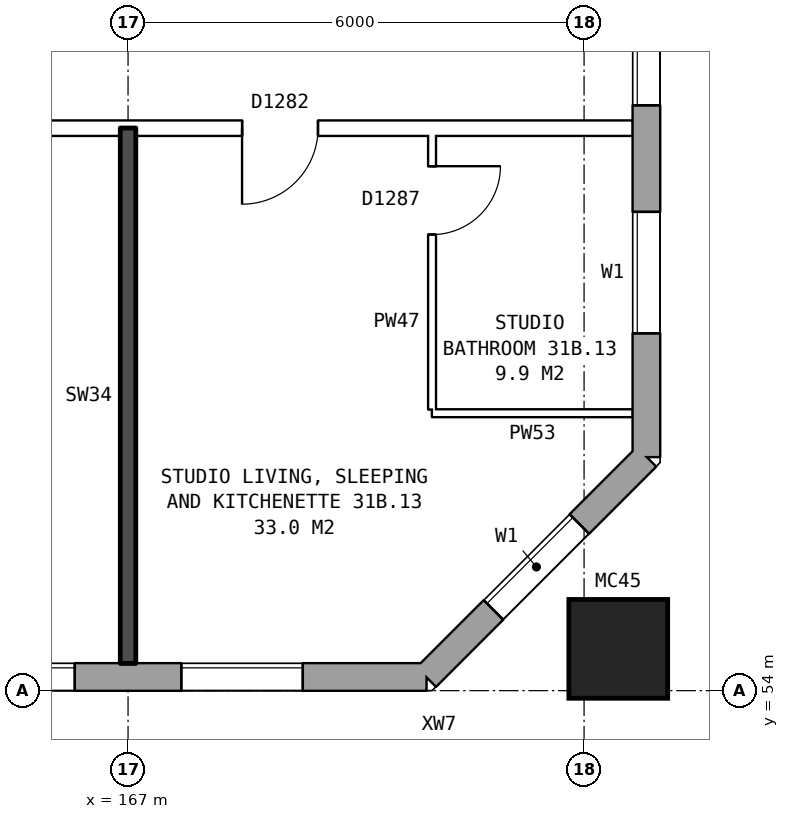
"""IFC4 building model, lengths in metres.
Left out: names, types, materials, properties, quantities, classifications, styles, units other than length and angle.
Written with IfcOpenShell. Run it as: python <this file> out.ifc"""

import sys

from ifc_helpers import new_model, si_unit, direction, frame, frame_2d, origin, origin_2d, place, context, subcontext, project, spatial, rectangle, hollow_rectangle, extrude, element, fill, save


model = new_model("IFC4")
c1 = context("Model", 3, precision=1e-05, world=origin(), true_north=direction((0.0, 1.0)))
c2 = subcontext(c1, "Body", "Model", "MODEL_VIEW")
j1 = project(units=[si_unit("LENGTHUNIT", "METRE"), si_unit("PLANEANGLEUNIT", "RADIAN")], contexts=[c1])
p1 = place(None, origin())
s1 = spatial("IfcSite", under=j1, at=p1, CompositionType="ELEMENT")
p2 = place(p1, origin())
s2 = spatial("IfcBuilding", under=s1, at=p2, CompositionType="ELEMENT")
p3 = place(p2, frame((0.0, 0.0, 111.9)))
s3 = spatial("IfcBuildingStorey", under=s2, at=p3, CompositionType="ELEMENT", Elevation=111.9)
p4 = place(p3, frame((173.45, 54.55, 0.0), z_axis=(0.0, 0.0, 1.0), x_axis=(1.0, 0.0, 0.0)))
e1 = element("IfcColumn", 1, at=p4, inside=s3, PredefinedType="COLUMN", context=c2, shape_type="SweptSolid", body=[
    extrude(hollow_rectangle(XDim=1.3, YDim=1.3, WallThickness=0.07, at=origin_2d()), origin(), (0.0, 0.0, 1.0), 3.1),
])
p5 = place(p3, frame((134.075, 54.18, 0.0), z_axis=(0.0, 0.0, 1.0), x_axis=(1.0, 0.0, 0.0)))
e2 = element("IfcWall", 2, at=p5, inside=s3, PredefinedType="STANDARD", context=c2, shape_type="SweptSolid", body=[
    extrude(rectangle(XDim=36.851, YDim=0.36, at=frame_2d((18.425, 0.0))), origin(), (0.0, 0.0, 1.0), 2.85),
])
p6 = place(p5, frame((0.625, 0.0, 0.8)))
e3 = element("IfcOpeningElement", 3, at=p6, cuts=e2, PredefinedType="OPENING", context=c2, shape_type="SweptSolid", body=[
    extrude(rectangle(XDim=1.6, YDim=1.8, at=frame_2d((0.8, 0.9))), frame((0.0, 0.19, 0.0), z_axis=(0.0, -1.0, 0.0), x_axis=(1.0, 0.0, 0.0)), (0.0, 0.0, 1.0), 0.38),
])
p7 = place(p5, frame((3.625, 0.0, 0.8)))
e4 = element("IfcOpeningElement", 4, at=p7, cuts=e2, PredefinedType="OPENING", context=c2, shape_type="SweptSolid", body=[
    extrude(rectangle(XDim=1.6, YDim=1.8, at=frame_2d((0.8, 0.9))), frame((0.0, 0.19, 0.0), z_axis=(0.0, -1.0, 0.0), x_axis=(1.0, 0.0, 0.0)), (0.0, 0.0, 1.0), 0.38),
])
p8 = place(p5, frame((6.625, 0.0, 0.8)))
e5 = element("IfcOpeningElement", 5, at=p8, cuts=e2, PredefinedType="OPENING", context=c2, shape_type="SweptSolid", body=[
    extrude(rectangle(XDim=1.6, YDim=1.8, at=frame_2d((0.8, 0.9))), frame((0.0, 0.19, 0.0), z_axis=(0.0, -1.0, 0.0), x_axis=(1.0, 0.0, 0.0)), (0.0, 0.0, 1.0), 0.38),
])
p9 = place(p5, frame((9.625, 0.0, 0.8)))
e6 = element("IfcOpeningElement", 6, at=p9, cuts=e2, PredefinedType="OPENING", context=c2, shape_type="SweptSolid", body=[
    extrude(rectangle(XDim=1.6, YDim=1.8, at=frame_2d((0.8, 0.9))), frame((0.0, 0.19, 0.0), z_axis=(0.0, -1.0, 0.0), x_axis=(1.0, 0.0, 0.0)), (0.0, 0.0, 1.0), 0.38),
])
p10 = place(p5, frame((12.625, 0.0, 0.8)))
e7 = element("IfcOpeningElement", 7, at=p10, cuts=e2, PredefinedType="OPENING", context=c2, shape_type="SweptSolid", body=[
    extrude(rectangle(XDim=1.6, YDim=1.8, at=frame_2d((0.8, 0.9))), frame((0.0, 0.19, 0.0), z_axis=(0.0, -1.0, 0.0), x_axis=(1.0, 0.0, 0.0)), (0.0, 0.0, 1.0), 0.38),
])
p11 = place(p5, frame((15.125, 0.0, 1.35)))
e8 = element("IfcOpeningElement", 8, at=p11, cuts=e2, PredefinedType="OPENING", context=c2, shape_type="SweptSolid", body=[
    extrude(rectangle(XDim=1.2, YDim=1.2, at=frame_2d((0.6, 0.6))), frame((0.0, 0.19, 0.0), z_axis=(0.0, -1.0, 0.0), x_axis=(1.0, 0.0, 0.0)), (0.0, 0.0, 1.0), 0.38),
])
p12 = place(p5, frame((18.075, 0.0, 0.25)))
e9 = element("IfcOpeningElement", 9, at=p12, cuts=e2, PredefinedType="OPENING", context=c2, shape_type="SweptSolid", body=[
    extrude(rectangle(XDim=0.8, YDim=1.5, at=frame_2d((0.4, 0.75))), frame((0.0, 0.19, 0.0), z_axis=(0.0, -1.0, 0.0), x_axis=(1.0, 0.0, 0.0)), (0.0, 0.0, 1.0), 0.38),
])
p13 = place(p5, frame((21.625, 0.0, 0.8)))
e10 = element("IfcOpeningElement", 10, at=p13, cuts=e2, PredefinedType="OPENING", context=c2, shape_type="SweptSolid", body=[
    extrude(rectangle(XDim=1.6, YDim=1.8, at=frame_2d((0.8, 0.9))), frame((0.0, 0.19, 0.0), z_axis=(0.0, -1.0, 0.0), x_axis=(1.0, 0.0, 0.0)), (0.0, 0.0, 1.0), 0.38),
])
p14 = place(p5, frame((24.625, 0.0, 0.8)))
e11 = element("IfcOpeningElement", 11, at=p14, cuts=e2, PredefinedType="OPENING", context=c2, shape_type="SweptSolid", body=[
    extrude(rectangle(XDim=1.6, YDim=1.8, at=frame_2d((0.8, 0.9))), frame((0.0, 0.19, 0.0), z_axis=(0.0, -1.0, 0.0), x_axis=(1.0, 0.0, 0.0)), (0.0, 0.0, 1.0), 0.38),
])
p15 = place(p5, frame((27.625, 0.0, 0.8)))
e12 = element("IfcOpeningElement", 12, at=p15, cuts=e2, PredefinedType="OPENING", context=c2, shape_type="SweptSolid", body=[
    extrude(rectangle(XDim=1.6, YDim=1.8, at=frame_2d((0.8, 0.9))), frame((0.0, 0.19, 0.0), z_axis=(0.0, -1.0, 0.0), x_axis=(1.0, 0.0, 0.0)), (0.0, 0.0, 1.0), 0.38),
])
p16 = place(p5, frame((30.625, 0.0, 0.8)))
e13 = element("IfcOpeningElement", 13, at=p16, cuts=e2, PredefinedType="OPENING", context=c2, shape_type="SweptSolid", body=[
    extrude(rectangle(XDim=1.6, YDim=1.8, at=frame_2d((0.8, 0.9))), frame((0.0, 0.19, 0.0), z_axis=(0.0, -1.0, 0.0), x_axis=(1.0, 0.0, 0.0)), (0.0, 0.0, 1.0), 0.38),
])
p17 = place(p5, frame((33.625, 0.0, 0.8)))
e14 = element("IfcOpeningElement", 14, at=p17, cuts=e2, PredefinedType="OPENING", context=c2, shape_type="SweptSolid", body=[
    extrude(rectangle(XDim=1.6, YDim=1.8, at=frame_2d((0.8, 0.9))), frame((0.0, 0.19, 0.0), z_axis=(0.0, -1.0, 0.0), x_axis=(1.0, 0.0, 0.0)), (0.0, 0.0, 1.0), 0.38),
])
p18 = place(p5, frame((17.075, 0.0, 0.15)))
e15 = element("IfcOpeningElement", 15, at=p18, cuts=e2, PredefinedType="OPENING", context=c2, shape_type="SweptSolid", body=[
    extrude(rectangle(XDim=0.6, YDim=0.9, at=frame_2d((0.3, 0.45))), frame((0.0, 0.19, 0.0), z_axis=(0.0, -1.0, 0.0), x_axis=(1.0, 0.0, 0.0)), (0.0, 0.0, 1.0), 0.38),
])
p19 = place(p5, frame((19.175, 0.0, 0.15)))
e16 = element("IfcOpeningElement", 16, at=p19, cuts=e2, PredefinedType="OPENING", context=c2, shape_type="SweptSolid", body=[
    extrude(rectangle(XDim=0.6, YDim=0.9, at=frame_2d((0.3, 0.45))), frame((0.0, 0.19, 0.0), z_axis=(0.0, -1.0, 0.0), x_axis=(1.0, 0.0, 0.0)), (0.0, 0.0, 1.0), 0.38),
])
p20 = place(p3, frame((170.925, 54.18, 0.0), z_axis=(0.0, 0.0, 1.0), x_axis=(0.707106781187, 0.707106781187, 0.0)))
e17 = element("IfcWall", 17, at=p20, inside=s3, PredefinedType="STANDARD", context=c2, shape_type="SweptSolid", body=[
    extrude(rectangle(XDim=4.094, YDim=0.36, at=frame_2d((2.047, 0.0))), origin(), (0.0, 0.0, 1.0), 2.85),
])
p21 = place(p20, frame((1.247, 0.0, 0.8)))
e18 = element("IfcOpeningElement", 18, at=p21, cuts=e17, PredefinedType="OPENING", context=c2, shape_type="SweptSolid", body=[
    extrude(rectangle(XDim=1.6, YDim=1.8, at=frame_2d((0.8, 0.9))), frame((0.0, 0.19, 0.0), z_axis=(0.0, -1.0, 0.0), x_axis=(1.0, 0.0, 0.0)), (0.0, 0.0, 1.0), 0.38),
])
p22 = place(p3, frame((173.82, 57.075, 0.0), z_axis=(0.0, 0.0, 1.0), x_axis=(0.0, 1.0, 0.0)))
e19 = element("IfcWall", 19, at=p22, inside=s3, PredefinedType="STANDARD", context=c2, shape_type="SweptSolid", body=[
    extrude(rectangle(XDim=25.851, YDim=0.36, at=frame_2d((12.925, 0.0))), origin(), (0.0, 0.0, 1.0), 2.85),
])
p23 = place(p22, frame((1.625, 0.0, 0.8)))
e20 = element("IfcOpeningElement", 20, at=p23, cuts=e19, PredefinedType="OPENING", context=c2, shape_type="SweptSolid", body=[
    extrude(rectangle(XDim=1.6, YDim=1.8, at=frame_2d((0.8, 0.9))), frame((0.0, 0.19, 0.0), z_axis=(0.0, -1.0, 0.0), x_axis=(1.0, 0.0, 0.0)), (0.0, 0.0, 1.0), 0.38),
])
p24 = place(p22, frame((4.625, 0.0, 0.8)))
e21 = element("IfcOpeningElement", 21, at=p24, cuts=e19, PredefinedType="OPENING", context=c2, shape_type="SweptSolid", body=[
    extrude(rectangle(XDim=1.6, YDim=1.8, at=frame_2d((0.8, 0.9))), frame((0.0, 0.19, 0.0), z_axis=(0.0, -1.0, 0.0), x_axis=(1.0, 0.0, 0.0)), (0.0, 0.0, 1.0), 0.38),
])
p25 = place(p22, frame((7.625, 0.0, 0.8)))
e22 = element("IfcOpeningElement", 22, at=p25, cuts=e19, PredefinedType="OPENING", context=c2, shape_type="SweptSolid", body=[
    extrude(rectangle(XDim=1.6, YDim=1.8, at=frame_2d((0.8, 0.9))), frame((0.0, 0.19, 0.0), z_axis=(0.0, -1.0, 0.0), x_axis=(1.0, 0.0, 0.0)), (0.0, 0.0, 1.0), 0.38),
])
p26 = place(p22, frame((10.625, 0.0, 0.8)))
e23 = element("IfcOpeningElement", 23, at=p26, cuts=e19, PredefinedType="OPENING", context=c2, shape_type="SweptSolid", body=[
    extrude(rectangle(XDim=1.6, YDim=1.8, at=frame_2d((0.8, 0.9))), frame((0.0, 0.19, 0.0), z_axis=(0.0, -1.0, 0.0), x_axis=(1.0, 0.0, 0.0)), (0.0, 0.0, 1.0), 0.38),
])
p27 = place(p22, frame((13.625, 0.0, 0.8)))
e24 = element("IfcOpeningElement", 24, at=p27, cuts=e19, PredefinedType="OPENING", context=c2, shape_type="SweptSolid", body=[
    extrude(rectangle(XDim=1.6, YDim=1.8, at=frame_2d((0.8, 0.9))), frame((0.0, 0.19, 0.0), z_axis=(0.0, -1.0, 0.0), x_axis=(1.0, 0.0, 0.0)), (0.0, 0.0, 1.0), 0.38),
])
p28 = place(p22, frame((16.625, 0.0, 0.8)))
e25 = element("IfcOpeningElement", 25, at=p28, cuts=e19, PredefinedType="OPENING", context=c2, shape_type="SweptSolid", body=[
    extrude(rectangle(XDim=1.6, YDim=1.8, at=frame_2d((0.8, 0.9))), frame((0.0, 0.19, 0.0), z_axis=(0.0, -1.0, 0.0), x_axis=(1.0, 0.0, 0.0)), (0.0, 0.0, 1.0), 0.38),
])
p29 = place(p22, frame((19.625, 0.0, 0.8)))
e26 = element("IfcOpeningElement", 26, at=p29, cuts=e19, PredefinedType="OPENING", context=c2, shape_type="SweptSolid", body=[
    extrude(rectangle(XDim=1.6, YDim=1.8, at=frame_2d((0.8, 0.9))), frame((0.0, 0.19, 0.0), z_axis=(0.0, -1.0, 0.0), x_axis=(1.0, 0.0, 0.0)), (0.0, 0.0, 1.0), 0.38),
])
p30 = place(p22, frame((22.625, 0.0, 0.8)))
e27 = element("IfcOpeningElement", 27, at=p30, cuts=e19, PredefinedType="OPENING", context=c2, shape_type="SweptSolid", body=[
    extrude(rectangle(XDim=1.6, YDim=1.8, at=frame_2d((0.8, 0.9))), frame((0.0, 0.19, 0.0), z_axis=(0.0, -1.0, 0.0), x_axis=(1.0, 0.0, 0.0)), (0.0, 0.0, 1.0), 0.38),
])
p31 = place(p3, frame((171.0, 57.65, 0.0), z_axis=(0.0, 0.0, 1.0), x_axis=(1.0, 0.0, 0.0)))
e28 = element("IfcWall", 28, at=p31, inside=s3, PredefinedType="PARTITIONING", context=c2, shape_type="SweptSolid", body=[
    extrude(rectangle(XDim=2.64, YDim=0.1, at=frame_2d((1.32, 0.0))), origin(), (0.0, 0.0, 1.0), 2.85),
])
p32 = place(p3, frame((155.1, 61.4, 0.0), z_axis=(0.0, 0.0, 1.0), x_axis=(1.0, 0.0, 0.0)))
e29 = element("IfcWall", 29, at=p32, inside=s3, PredefinedType="PARTITIONING", context=c2, shape_type="SweptSolid", body=[
    extrude(rectangle(XDim=18.54, YDim=0.2, at=frame_2d((9.27, 0.0))), origin(), (0.0, 0.0, 1.0), 2.85),
])
p33 = place(p32, frame((1.45, 0.0, 0.0)))
e30 = element("IfcOpeningElement", 30, at=p33, cuts=e29, PredefinedType="OPENING", context=c2, shape_type="SweptSolid", body=[
    extrude(rectangle(XDim=1.0, YDim=2.1, at=frame_2d((0.5, 1.05))), frame((0.0, 0.11, 0.0), z_axis=(0.0, -1.0, 0.0), x_axis=(1.0, 0.0, 0.0)), (0.0, 0.0, 1.0), 0.22),
])
p34 = place(p32, frame((9.6, 0.0, 0.0)))
e31 = element("IfcOpeningElement", 31, at=p34, cuts=e29, PredefinedType="OPENING", context=c2, shape_type="SweptSolid", body=[
    extrude(rectangle(XDim=1.0, YDim=2.1, at=frame_2d((0.5, 1.05))), frame((0.0, 0.11, 0.0), z_axis=(0.0, -1.0, 0.0), x_axis=(1.0, 0.0, 0.0)), (0.0, 0.0, 1.0), 0.22),
])
p35 = place(p32, frame((13.4, 0.0, 0.0)))
e32 = element("IfcOpeningElement", 32, at=p35, cuts=e29, PredefinedType="OPENING", context=c2, shape_type="SweptSolid", body=[
    extrude(rectangle(XDim=1.0, YDim=2.1, at=frame_2d((0.5, 1.05))), frame((0.0, 0.11, 0.0), z_axis=(0.0, -1.0, 0.0), x_axis=(1.0, 0.0, 0.0)), (0.0, 0.0, 1.0), 0.22),
])
p36 = place(p3, frame((167.0, 54.36, 0.0), z_axis=(0.0, 0.0, 1.0), x_axis=(0.0, 1.0, 0.0)))
e33 = element("IfcWall", 33, at=p36, inside=s3, PredefinedType="SOLIDWALL", context=c2, shape_type="SweptSolid", body=[
    extrude(rectangle(XDim=7.04, YDim=0.2, at=frame_2d((3.52, 0.0))), origin(), (0.0, 0.0, 1.0), 2.85),
])
p37 = place(p3, frame((171.0, 57.7, 0.0), z_axis=(0.0, 0.0, 1.0), x_axis=(0.0, 1.0, 0.0)))
e34 = element("IfcWall", 34, at=p37, inside=s3, PredefinedType="PARTITIONING", context=c2, shape_type="SweptSolid", body=[
    extrude(rectangle(XDim=3.6, YDim=0.1, at=frame_2d((1.8, 0.0))), origin(), (0.0, 0.0, 1.0), 2.85),
])
p38 = place(p37, frame((2.3, 0.0, 0.0)))
e35 = element("IfcOpeningElement", 35, at=p38, cuts=e34, PredefinedType="OPENING", context=c2, shape_type="SweptSolid", body=[
    extrude(rectangle(XDim=0.9, YDim=2.1, at=frame_2d((0.45, 1.05))), frame((0.0, 0.06, 0.0), z_axis=(0.0, -1.0, 0.0), x_axis=(1.0, 0.0, 0.0)), (0.0, 0.0, 1.0), 0.12),
])
p39 = place(p16, origin())
e36 = element("IfcWindow", 36, at=p39, inside=s3, PartitioningType="SINGLE_PANEL", PredefinedType="WINDOW", context=c2, shape_type="SweptSolid", body=[
    extrude(rectangle(XDim=1.6, YDim=1.8, at=frame_2d((0.8, 0.9))), frame((0.0, 0.15, 0.0), z_axis=(0.0, -1.0, 0.0), x_axis=(1.0, 0.0, 0.0)), (0.0, 0.0, 1.0), 0.06),
])
fill(e13, e36)
p40 = place(p17, origin())
e37 = element("IfcWindow", 37, at=p40, inside=s3, PartitioningType="SINGLE_PANEL", PredefinedType="WINDOW", context=c2, shape_type="SweptSolid", body=[
    extrude(rectangle(XDim=1.6, YDim=1.8, at=frame_2d((0.8, 0.9))), frame((0.0, 0.15, 0.0), z_axis=(0.0, -1.0, 0.0), x_axis=(1.0, 0.0, 0.0)), (0.0, 0.0, 1.0), 0.06),
])
fill(e14, e37)
p41 = place(p21, origin())
e38 = element("IfcWindow", 38, at=p41, inside=s3, PartitioningType="SINGLE_PANEL", PredefinedType="WINDOW", context=c2, shape_type="SweptSolid", body=[
    extrude(rectangle(XDim=1.6, YDim=1.8, at=frame_2d((0.8, 0.9))), frame((0.0, 0.15, 0.0), z_axis=(0.0, -1.0, 0.0), x_axis=(1.0, 0.0, 0.0)), (0.0, 0.0, 1.0), 0.06),
])
fill(e18, e38)
p42 = place(p23, origin())
e39 = element("IfcWindow", 39, at=p42, inside=s3, PartitioningType="SINGLE_PANEL", PredefinedType="WINDOW", context=c2, shape_type="SweptSolid", body=[
    extrude(rectangle(XDim=1.6, YDim=1.8, at=frame_2d((0.8, 0.9))), frame((0.0, 0.15, 0.0), z_axis=(0.0, -1.0, 0.0), x_axis=(1.0, 0.0, 0.0)), (0.0, 0.0, 1.0), 0.06),
])
fill(e20, e39)
p43 = place(p24, origin())
e40 = element("IfcWindow", 40, at=p43, inside=s3, PartitioningType="SINGLE_PANEL", PredefinedType="WINDOW", context=c2, shape_type="SweptSolid", body=[
    extrude(rectangle(XDim=1.6, YDim=1.8, at=frame_2d((0.8, 0.9))), frame((0.0, 0.15, 0.0), z_axis=(0.0, -1.0, 0.0), x_axis=(1.0, 0.0, 0.0)), (0.0, 0.0, 1.0), 0.06),
])
fill(e21, e40)
p44 = place(p35, frame((1.0, 0.0, 0.0), z_axis=(0.0, 0.0, 1.0), x_axis=(-1.0, 0.0, 0.0)))
e41 = element("IfcDoor", 41, at=p44, inside=s3, OperationType="SINGLE_SWING_RIGHT", PredefinedType="DOOR", context=c2, shape_type="SweptSolid", body=[
    extrude(rectangle(XDim=1.0, YDim=2.1, at=frame_2d((0.5, 1.05))), frame((0.0, 0.025, 0.0), z_axis=(0.0, -1.0, 0.0), x_axis=(1.0, 0.0, 0.0)), (0.0, 0.0, 1.0), 0.05),
])
fill(e32, e41)
p45 = place(p38, frame((0.9, 0.0, 0.0), z_axis=(0.0, 0.0, 1.0), x_axis=(-1.0, 0.0, 0.0)))
e42 = element("IfcDoor", 42, at=p45, inside=s3, OperationType="SINGLE_SWING_LEFT", PredefinedType="DOOR", context=c2, shape_type="SweptSolid", body=[
    extrude(rectangle(XDim=0.9, YDim=2.1, at=frame_2d((0.45, 1.05))), frame((0.0, 0.025, 0.0), z_axis=(0.0, -1.0, 0.0), x_axis=(1.0, 0.0, 0.0)), (0.0, 0.0, 1.0), 0.05),
])
fill(e35, e42)
save(model, sys.argv[1])
